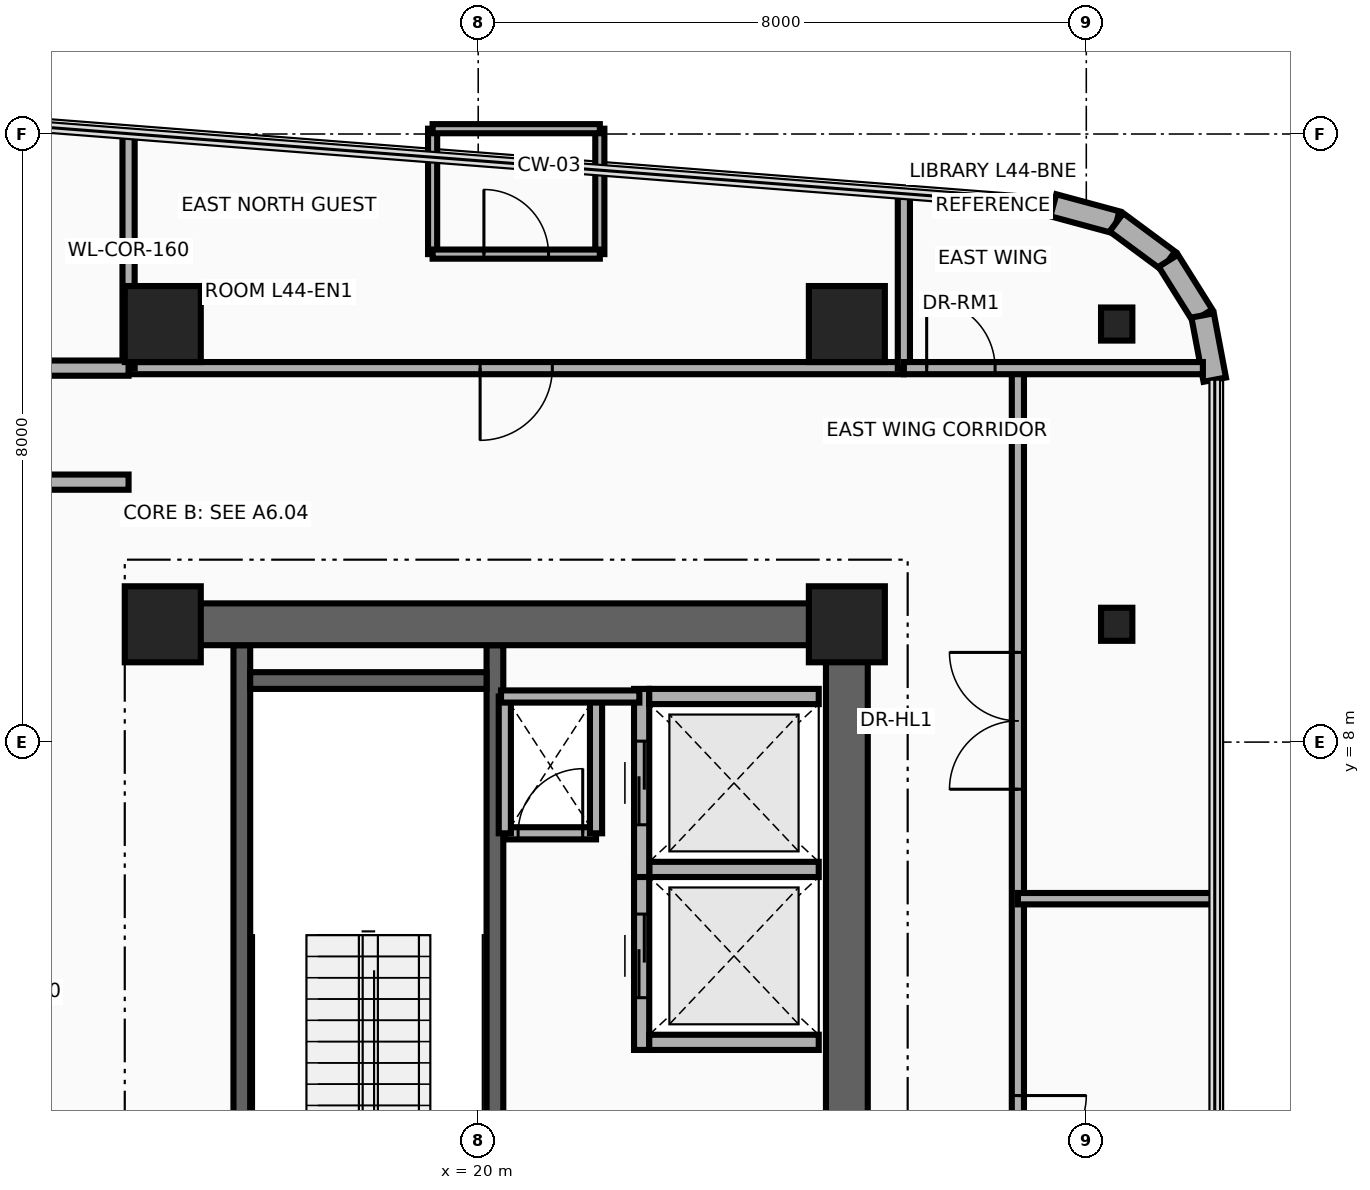
"""IFC4 building model, lengths in metres.
Left out: names, types, materials, properties, quantities, classifications, styles, units other than length and angle.
Written with IfcOpenShell. Run it as: python <this file> out.ifc"""

import sys

from ifc_helpers import new_model, si_unit, direction, frame, frame_2d, origin, origin_2d, place, context, subcontext, project, spatial, rectangle, i_section, extrude, source, transform, mapped, element, fill, save


model = new_model("IFC4")
c1 = context("Model", 3, precision=1e-05, world=origin(), true_north=direction((0.0, 1.0)))
c2 = subcontext(c1, "Body", "Model", "MODEL_VIEW")
j1 = project(units=[si_unit("LENGTHUNIT", "METRE"), si_unit("PLANEANGLEUNIT", "RADIAN")], contexts=[c1])
p1 = place(None, origin())
s1 = spatial("IfcSite", under=j1, at=p1, CompositionType="ELEMENT")
p2 = place(p1, origin())
s2 = spatial("IfcBuilding", under=s1, at=p2, CompositionType="ELEMENT")
p3 = place(p2, frame((0.0, 0.0, 172.3)))
s3 = spatial("IfcBuildingStorey", under=s2, at=p3, CompositionType="ELEMENT", Elevation=172.3)
for number, where, z_axis, x_axis in (
    (1, (16.89, 0.68, 0.0), (0.0, 0.0, 1.0), (0.0, 1.0, 0.0)),
    (2, (20.22, 0.68, 0.0), (0.0, 0.0, 1.0), (0.0, 1.0, 0.0)),
):
    element("IfcWall", number, at=place(p3, frame(where, z_axis=z_axis, x_axis=x_axis)), inside=s3, PredefinedType="SHEAR", context=c2, shape_type="SweptSolid", body=[
        extrude(rectangle(XDim=8.595, YDim=0.22, at=frame_2d((4.297, 0.0))), origin(), (0.0, 0.0, 1.0), 3.93),
    ])
p4 = place(p3, frame((17.0, 8.81, 0.0), z_axis=(0.0, 0.0, 1.0), x_axis=(1.0, 0.0, 0.0)))
e3 = element("IfcWall", 3, at=p4, inside=s3, PredefinedType="SHEAR", context=c2, shape_type="SweptSolid", body=[
    extrude(rectangle(XDim=3.11, YDim=0.22, at=frame_2d((1.555, 0.0))), origin(), (0.0, 0.0, 1.0), 3.93),
])
p5 = place(p3, frame((24.85, 0.95, 0.0), z_axis=(0.0, 0.0, 1.0), x_axis=(0.0, 1.0, 0.0)))
e4 = element("IfcWall", 4, at=p5, inside=s3, PredefinedType="SHEAR", context=c2, shape_type="SweptSolid", body=[
    extrude(rectangle(XDim=8.875, YDim=0.55, at=frame_2d((4.438, 0.0))), origin(), (0.0, 0.0, 1.0), 3.93),
])
p6 = place(p3, frame((15.85, 9.55, 0.0), z_axis=(0.0, 0.0, 1.0), x_axis=(1.0, 0.0, 0.0)))
e5 = element("IfcWall", 5, at=p6, inside=s3, PredefinedType="SHEAR", context=c2, shape_type="SweptSolid", body=[
    extrude(rectangle(XDim=9.0, YDim=0.55, at=frame_2d((4.5, 0.0))), origin(), (0.0, 0.0, 1.0), 3.93),
])
m1 = source(origin(), c2, "Body", "SweptSolid", [
    extrude(rectangle(XDim=1.0, YDim=1.0, at=origin_2d()), origin(), (0.0, 0.0, 1.0), 4.25),
])
for number, where, z_axis, x_axis in (
    (6, (15.85, 9.55, 0.0), (0.0, 0.0, 1.0), (1.0, 0.0, 0.0)),
    (7, (24.85, 9.55, 0.0), (0.0, 0.0, 1.0), (1.0, 0.0, 0.0)),
):
    element("IfcColumn", number, at=place(p3, frame(where, z_axis=z_axis, x_axis=x_axis)), inside=s3, PredefinedType="COLUMN", context=c2, shape_type="MappedRepresentation", body=[
        mapped(m1, transform((0.0, 0.0, 0.0), x_axis=(1.0, 0.0, 0.0), y_axis=(0.0, 1.0, 0.0), z_axis=(0.0, 0.0, 1.0), scale=1.0)),
    ])
m2 = source(origin(), c2, "Body", "SweptSolid", [
    extrude(i_section(OverallWidth=0.412, OverallDepth=0.435, WebThickness=0.036, FlangeThickness=0.057, at=origin_2d()), origin(), (0.0, 0.0, 1.0), 4.25),
])
p7 = place(p3, frame((28.4, 9.55, 0.0), z_axis=(0.0, 0.0, 1.0), x_axis=(1.0, 0.0, 0.0)))
e8 = element("IfcColumn", 8, at=p7, inside=s3, PredefinedType="COLUMN", context=c2, shape_type="MappedRepresentation", body=[
    mapped(m2, transform((0.0, 0.0, 0.0), x_axis=(1.0, 0.0, 0.0), y_axis=(0.0, 1.0, 0.0), z_axis=(0.0, 0.0, 1.0), scale=1.0)),
])
for number, where, z_axis, x_axis in (
    (9, (15.85, 13.5, 0.0), (0.0, 0.0, 1.0), (1.0, 0.0, 0.0)),
    (10, (24.85, 13.5, 0.0), (0.0, 0.0, 1.0), (1.0, 0.0, 0.0)),
):
    element("IfcColumn", number, at=place(p3, frame(where, z_axis=z_axis, x_axis=x_axis)), inside=s3, PredefinedType="COLUMN", context=c2, shape_type="MappedRepresentation", body=[
        mapped(m1, transform((0.0, 0.0, 0.0), x_axis=(1.0, 0.0, 0.0), y_axis=(0.0, 1.0, 0.0), z_axis=(0.0, 0.0, 1.0), scale=1.0)),
    ])
p8 = place(p3, frame((28.4, 13.5, 0.0), z_axis=(0.0, 0.0, 1.0), x_axis=(1.0, 0.0, 0.0)))
e11 = element("IfcColumn", 11, at=p8, inside=s3, PredefinedType="COLUMN", context=c2, shape_type="MappedRepresentation", body=[
    mapped(m2, transform((0.0, 0.0, 0.0), x_axis=(1.0, 0.0, 0.0), y_axis=(0.0, 1.0, 0.0), z_axis=(0.0, 0.0, 1.0), scale=1.0)),
])
p9 = place(p3, frame((27.566, 15.062, 0.0), z_axis=(0.0, 0.0, 1.0), x_axis=(0.965357594382, -0.260930479187, 0.0)))
e12 = element("IfcWall", 12, at=p9, inside=s3, PredefinedType="SOLIDWALL", context=c2, shape_type="SweptSolid", body=[
    extrude(rectangle(XDim=0.86, YDim=0.3, at=frame_2d((0.43, 0.0))), origin(), (0.0, 0.0, 1.0), 3.93),
])
p10 = place(p3, frame((28.396, 14.838, 0.0), z_axis=(0.0, 0.0, 1.0), x_axis=(0.803847397988, -0.594835574548, 0.0)))
e13 = element("IfcWall", 13, at=p10, inside=s3, PredefinedType="SOLIDWALL", context=c2, shape_type="SweptSolid", body=[
    extrude(rectangle(XDim=0.849, YDim=0.3, at=frame_2d((0.425, 0.0))), origin(), (0.0, 0.0, 1.0), 3.93),
])
p11 = place(p3, frame((29.079, 14.333, 0.0), z_axis=(0.0, 0.0, 1.0), x_axis=(0.53134147342, -0.847157741288, 0.0)))
e14 = element("IfcWall", 14, at=p11, inside=s3, PredefinedType="SOLIDWALL", context=c2, shape_type="SweptSolid", body=[
    extrude(rectangle(XDim=0.85, YDim=0.3, at=frame_2d((0.425, 0.0))), origin(), (0.0, 0.0, 1.0), 3.93),
])
p12 = place(p3, frame((29.531, 13.613, 0.0), z_axis=(0.0, 0.0, 1.0), x_axis=(0.185402686284, -0.982662629756, 0.0)))
e15 = element("IfcWall", 15, at=p12, inside=s3, PredefinedType="SOLIDWALL", context=c2, shape_type="SweptSolid", body=[
    extrude(rectangle(XDim=0.86, YDim=0.3, at=frame_2d((0.43, 0.0))), origin(), (0.0, 0.0, 1.0), 3.93),
])
p13 = place(p3, frame((22.15, 3.95, 0.0), z_axis=(0.0, 0.0, 1.0), x_axis=(0.0, 1.0, 0.0)))
e16 = element("IfcWall", 16, at=p13, inside=s3, PredefinedType="MOVABLE", context=c2, shape_type="SweptSolid", body=[
    extrude(rectangle(XDim=2.475, YDim=0.2, at=frame_2d((1.238, 0.0))), origin(), (0.0, 0.0, 1.0), 3.93),
])
p14 = place(p13, frame((0.688, 0.0, 0.0)))
e17 = element("IfcOpeningElement", 17, at=p14, cuts=e16, PredefinedType="OPENING", context=c2, shape_type="SweptSolid", body=[
    extrude(rectangle(XDim=1.1, YDim=2.1, at=frame_2d((0.55, 1.05))), frame((0.0, 0.115, 0.0), z_axis=(0.0, -1.0, 0.0), x_axis=(1.0, 0.0, 0.0)), (0.0, 0.0, 1.0), 0.23),
])
for number, where, z_axis, x_axis in (
    (18, (22.25, 4.05, 0.0), (0.0, 0.0, 1.0), (1.0, 0.0, 0.0)),
    (19, (22.25, 6.325, 0.0), (0.0, 0.0, 1.0), (1.0, 0.0, 0.0)),
):
    element("IfcWall", number, at=place(p3, frame(where, z_axis=z_axis, x_axis=x_axis)), inside=s3, PredefinedType="MOVABLE", context=c2, shape_type="SweptSolid", body=[
        extrude(rectangle(XDim=2.23, YDim=0.2, at=frame_2d((1.115, 0.0))), origin(), (0.0, 0.0, 1.0), 3.93),
    ])
p15 = place(p3, frame((22.15, 6.225, 0.0), z_axis=(0.0, 0.0, 1.0), x_axis=(0.0, 1.0, 0.0)))
e20 = element("IfcWall", 20, at=p15, inside=s3, PredefinedType="MOVABLE", context=c2, shape_type="SweptSolid", body=[
    extrude(rectangle(XDim=2.475, YDim=0.2, at=frame_2d((1.237, 0.0))), origin(), (0.0, 0.0, 1.0), 3.93),
])
p16 = place(p15, frame((0.688, 0.0, 0.0)))
e21 = element("IfcOpeningElement", 21, at=p16, cuts=e20, PredefinedType="OPENING", context=c2, shape_type="SweptSolid", body=[
    extrude(rectangle(XDim=1.1, YDim=2.1, at=frame_2d((0.55, 1.05))), frame((0.0, 0.115, 0.0), z_axis=(0.0, -1.0, 0.0), x_axis=(1.0, 0.0, 0.0)), (0.0, 0.0, 1.0), 0.23),
])
p17 = place(p3, frame((22.25, 8.6, 0.0), z_axis=(0.0, 0.0, 1.0), x_axis=(1.0, 0.0, 0.0)))
e22 = element("IfcWall", 22, at=p17, inside=s3, PredefinedType="MOVABLE", context=c2, shape_type="SweptSolid", body=[
    extrude(rectangle(XDim=2.23, YDim=0.2, at=frame_2d((1.115, 0.0))), origin(), (0.0, 0.0, 1.0), 3.93),
])
p18 = place(p3, frame((20.35, 6.8, 0.0), z_axis=(0.0, 0.0, 1.0), x_axis=(1.0, 0.0, 0.0)))
e23 = element("IfcWall", 23, at=p18, inside=s3, PredefinedType="PARTITIONING", context=c2, shape_type="SweptSolid", body=[
    extrude(rectangle(XDim=1.2, YDim=0.16, at=frame_2d((0.6, 0.0))), origin(), (0.0, 0.0, 1.0), 3.93),
])
p19 = place(p18, frame((0.175, 0.0, 0.0)))
e24 = element("IfcOpeningElement", 24, at=p19, cuts=e23, PredefinedType="OPENING", context=c2, shape_type="SweptSolid", body=[
    extrude(rectangle(XDim=0.85, YDim=2.05, at=frame_2d((0.425, 1.025))), frame((0.0, 0.095, 0.0), z_axis=(0.0, -1.0, 0.0), x_axis=(1.0, 0.0, 0.0)), (0.0, 0.0, 1.0), 0.19),
])
for number, where, z_axis, x_axis in (
    (25, (21.55, 6.8, 0.0), (0.0, 0.0, 1.0), (0.0, 1.0, 0.0)),
    (26, (20.35, 6.8, 0.0), (0.0, 0.0, 1.0), (0.0, 1.0, 0.0)),
):
    element("IfcWall", number, at=place(p3, frame(where, z_axis=z_axis, x_axis=x_axis)), inside=s3, PredefinedType="PARTITIONING", context=c2, shape_type="SweptSolid", body=[
        extrude(rectangle(XDim=1.8, YDim=0.16, at=frame_2d((0.9, 0.0))), origin(), (0.0, 0.0, 1.0), 3.93),
    ])
p20 = place(p3, frame((20.3, 8.6, 0.0), z_axis=(0.0, 0.0, 1.0), x_axis=(1.0, 0.0, 0.0)))
e27 = element("IfcWall", 27, at=p20, inside=s3, PredefinedType="PARTITIONING", context=c2, shape_type="SweptSolid", body=[
    extrude(rectangle(XDim=1.82, YDim=0.16, at=frame_2d((0.91, 0.0))), origin(), (0.0, 0.0, 1.0), 3.93),
])
p21 = place(p3, frame((15.4, 12.92, 0.0), z_axis=(0.0, 0.0, 1.0), x_axis=(1.0, 0.0, 0.0)))
e28 = element("IfcWall", 28, at=p21, inside=s3, PredefinedType="PARTITIONING", context=c2, shape_type="SweptSolid", body=[
    extrude(rectangle(XDim=10.2, YDim=0.16, at=frame_2d((5.1, 0.0))), origin(), (0.0, 0.0, 1.0), 2.715),
])
p22 = place(p21, frame((4.625, 0.0, 0.0)))
e29 = element("IfcOpeningElement", 29, at=p22, cuts=e28, PredefinedType="OPENING", context=c2, shape_type="SweptSolid", body=[
    extrude(rectangle(XDim=0.95, YDim=2.15, at=frame_2d((0.475, 1.075))), frame((0.0, 0.095, 0.0), z_axis=(0.0, -1.0, 0.0), x_axis=(1.0, 0.0, 0.0)), (0.0, 0.0, 1.0), 0.19),
])
p23 = place(p3, frame((15.4, 12.92, 0.0), z_axis=(0.0, 0.0, 1.0), x_axis=(0.0, 1.0, 0.0)))
e30 = element("IfcWall", 30, at=p23, inside=s3, PredefinedType="PARTITIONING", context=c2, shape_type="SweptSolid", body=[
    extrude(rectangle(XDim=3.084, YDim=0.16, at=frame_2d((1.542, 0.0))), origin(), (0.0, 0.0, 1.0), 2.715),
])
p24 = place(p3, frame((25.6, 12.92, 0.0), z_axis=(0.0, 0.0, 1.0), x_axis=(0.0, 1.0, 0.0)))
e31 = element("IfcWall", 31, at=p24, inside=s3, PredefinedType="PARTITIONING", context=c2, shape_type="SweptSolid", body=[
    extrude(rectangle(XDim=2.295, YDim=0.16, at=frame_2d((1.147, 0.0))), origin(), (0.0, 0.0, 1.0), 2.965),
])
for number, where, z_axis, x_axis in (
    (32, (19.4, 14.42, 0.0), (0.0, 0.0, 1.0), (0.0, 1.0, 0.0)),
    (33, (21.6, 14.42, 0.0), (0.0, 0.0, 1.0), (0.0, 1.0, 0.0)),
):
    element("IfcWall", number, at=place(p3, frame(where, z_axis=z_axis, x_axis=x_axis)), inside=s3, PredefinedType="PARTITIONING", context=c2, shape_type="SweptSolid", body=[
        extrude(rectangle(XDim=1.65, YDim=0.12, at=frame_2d((0.825, 0.0))), origin(), (0.0, 0.0, 1.0), 3.93),
    ])
p25 = place(p3, frame((19.4, 16.07, 0.0), z_axis=(0.0, 0.0, 1.0), x_axis=(1.0, 0.0, 0.0)))
e34 = element("IfcWall", 34, at=p25, inside=s3, PredefinedType="PARTITIONING", context=c2, shape_type="SweptSolid", body=[
    extrude(rectangle(XDim=2.2, YDim=0.12, at=frame_2d((1.1, 0.0))), origin(), (0.0, 0.0, 1.0), 3.93),
])
p26 = place(p3, frame((19.4, 14.42, 0.0), z_axis=(0.0, 0.0, 1.0), x_axis=(1.0, 0.0, 0.0)))
e35 = element("IfcWall", 35, at=p26, inside=s3, PredefinedType="PARTITIONING", context=c2, shape_type="SweptSolid", body=[
    extrude(rectangle(XDim=2.2, YDim=0.12, at=frame_2d((1.1, 0.0))), origin(), (0.0, 0.0, 1.0), 3.93),
])
p27 = place(p26, frame((0.675, 0.0, 0.0)))
e36 = element("IfcOpeningElement", 36, at=p27, cuts=e35, PredefinedType="OPENING", context=c2, shape_type="SweptSolid", body=[
    extrude(rectangle(XDim=0.85, YDim=2.1, at=frame_2d((0.425, 1.05))), frame((0.0, 0.075, 0.0), z_axis=(0.0, -1.0, 0.0), x_axis=(1.0, 0.0, 0.0)), (0.0, 0.0, 1.0), 0.15),
])
p28 = place(p3, frame((27.1, -11.89, 0.0), z_axis=(0.0, 0.0, 1.0), x_axis=(0.0, 1.0, 0.0)))
e37 = element("IfcWall", 37, at=p28, inside=s3, PredefinedType="PARTITIONING", context=c2, shape_type="SweptSolid", body=[
    extrude(rectangle(XDim=24.81, YDim=0.16, at=frame_2d((12.405, 0.0))), origin(), (0.0, 0.0, 1.0), 2.965),
])
p29 = place(p28, frame((1.12, 0.0, 0.0)))
e38 = element("IfcOpeningElement", 38, at=p29, cuts=e37, PredefinedType="OPENING", context=c2, shape_type="SweptSolid", body=[
    extrude(rectangle(XDim=0.9, YDim=2.1, at=frame_2d((0.45, 1.05))), frame((0.0, 0.095, 0.0), z_axis=(0.0, -1.0, 0.0), x_axis=(1.0, 0.0, 0.0)), (0.0, 0.0, 1.0), 0.19),
])
p30 = place(p28, frame((6.46, 0.0, 0.0)))
e39 = element("IfcOpeningElement", 39, at=p30, cuts=e37, PredefinedType="OPENING", context=c2, shape_type="SweptSolid", body=[
    extrude(rectangle(XDim=1.8, YDim=2.15, at=frame_2d((0.9, 1.075))), frame((0.0, 0.095, 0.0), z_axis=(0.0, -1.0, 0.0), x_axis=(1.0, 0.0, 0.0)), (0.0, 0.0, 1.0), 0.19),
])
p31 = place(p28, frame((13.44, 0.0, 0.0)))
e40 = element("IfcOpeningElement", 40, at=p31, cuts=e37, PredefinedType="OPENING", context=c2, shape_type="SweptSolid", body=[
    extrude(rectangle(XDim=1.8, YDim=2.15, at=frame_2d((0.9, 1.075))), frame((0.0, 0.095, 0.0), z_axis=(0.0, -1.0, 0.0), x_axis=(1.0, 0.0, 0.0)), (0.0, 0.0, 1.0), 0.19),
])
p32 = place(p28, frame((19.27, 0.0, 0.0)))
e41 = element("IfcOpeningElement", 41, at=p32, cuts=e37, PredefinedType="OPENING", context=c2, shape_type="SweptSolid", body=[
    extrude(rectangle(XDim=1.8, YDim=2.15, at=frame_2d((0.9, 1.075))), frame((0.0, 0.095, 0.0), z_axis=(0.0, -1.0, 0.0), x_axis=(1.0, 0.0, 0.0)), (0.0, 0.0, 1.0), 0.19),
])
p33 = place(p3, frame((25.6, 12.92, 0.0), z_axis=(0.0, 0.0, 1.0), x_axis=(1.0, 0.0, 0.0)))
e42 = element("IfcWall", 42, at=p33, inside=s3, PredefinedType="PARTITIONING", context=c2, shape_type="SweptSolid", body=[
    extrude(rectangle(XDim=3.934, YDim=0.16, at=frame_2d((1.967, 0.0))), origin(), (0.0, 0.0, 1.0), 3.376),
])
p34 = place(p33, frame((0.3, 0.0, 0.0)))
e43 = element("IfcOpeningElement", 43, at=p34, cuts=e42, PredefinedType="OPENING", context=c2, shape_type="SweptSolid", body=[
    extrude(rectangle(XDim=0.9, YDim=2.1, at=frame_2d((0.45, 1.05))), frame((0.0, 0.095, 0.0), z_axis=(0.0, -1.0, 0.0), x_axis=(1.0, 0.0, 0.0)), (0.0, 0.0, 1.0), 0.19),
])
p35 = place(p3, frame((27.1, 5.94, 0.0), z_axis=(0.0, 0.0, 1.0), x_axis=(1.0, 0.0, 0.0)))
e44 = element("IfcWall", 44, at=p35, inside=s3, PredefinedType="PARTITIONING", context=c2, shape_type="SweptSolid", body=[
    extrude(rectangle(XDim=2.59, YDim=0.15, at=frame_2d((1.295, 0.0))), origin(), (0.0, 0.0, 1.0), 3.376),
])
p36 = place(p3, frame((13.42, 12.92, 0.0), z_axis=(0.0, 0.0, 1.0), x_axis=(1.0, 0.0, 0.0)))
e45 = element("IfcWall", 45, at=p36, inside=s3, PredefinedType="PARTITIONING", context=c2, shape_type="SweptSolid", body=[
    extrude(rectangle(XDim=1.98, YDim=0.2, at=frame_2d((0.99, 0.0))), origin(), (0.0, 0.0, 1.0), 2.715),
])
p37 = place(p3, frame((13.42, 11.42, 0.0), z_axis=(0.0, 0.0, 1.0), x_axis=(1.0, 0.0, 0.0)))
e46 = element("IfcWall", 46, at=p37, inside=s3, PredefinedType="PARTITIONING", context=c2, shape_type="SweptSolid", body=[
    extrude(rectangle(XDim=1.98, YDim=0.2, at=frame_2d((0.99, 0.0))), origin(), (0.0, 0.0, 1.0), 3.304),
])
p38 = place(p14, origin())
e47 = element("IfcDoor", 47, at=p38, inside=s3, OperationType="DOUBLE_DOOR_SLIDING", PredefinedType="DOOR", context=c2, shape_type="SweptSolid", body=[
    extrude(rectangle(XDim=1.1, YDim=2.1, at=frame_2d((0.55, 1.05))), frame((0.0, 0.025, 0.0), z_axis=(0.0, -1.0, 0.0), x_axis=(1.0, 0.0, 0.0)), (0.0, 0.0, 1.0), 0.05),
])
fill(e17, e47)
p39 = place(p16, origin())
e48 = element("IfcDoor", 48, at=p39, inside=s3, OperationType="DOUBLE_DOOR_SLIDING", PredefinedType="DOOR", context=c2, shape_type="SweptSolid", body=[
    extrude(rectangle(XDim=1.1, YDim=2.1, at=frame_2d((0.55, 1.05))), frame((0.0, 0.025, 0.0), z_axis=(0.0, -1.0, 0.0), x_axis=(1.0, 0.0, 0.0)), (0.0, 0.0, 1.0), 0.05),
])
fill(e21, e48)
p40 = place(p19, origin())
e49 = element("IfcDoor", 49, at=p40, inside=s3, OperationType="SINGLE_SWING_RIGHT", PredefinedType="DOOR", context=c2, shape_type="SweptSolid", body=[
    extrude(rectangle(XDim=0.85, YDim=2.05, at=frame_2d((0.425, 1.025))), frame((0.0, 0.025, 0.0), z_axis=(0.0, -1.0, 0.0), x_axis=(1.0, 0.0, 0.0)), (0.0, 0.0, 1.0), 0.05),
])
fill(e24, e49)
p41 = place(p22, frame((0.95, 0.0, 0.0), z_axis=(0.0, 0.0, 1.0), x_axis=(-1.0, 0.0, 0.0)))
e50 = element("IfcDoor", 50, at=p41, inside=s3, OperationType="SINGLE_SWING_LEFT", PredefinedType="DOOR", context=c2, shape_type="SweptSolid", body=[
    extrude(rectangle(XDim=0.95, YDim=2.15, at=frame_2d((0.475, 1.075))), frame((0.0, 0.025, 0.0), z_axis=(0.0, -1.0, 0.0), x_axis=(1.0, 0.0, 0.0)), (0.0, 0.0, 1.0), 0.05),
])
fill(e29, e50)
p42 = place(p27, origin())
e51 = element("IfcDoor", 51, at=p42, inside=s3, OperationType="SINGLE_SWING_RIGHT", PredefinedType="DOOR", context=c2, shape_type="SweptSolid", body=[
    extrude(rectangle(XDim=0.85, YDim=2.1, at=frame_2d((0.425, 1.05))), frame((0.0, 0.025, 0.0), z_axis=(0.0, -1.0, 0.0), x_axis=(1.0, 0.0, 0.0)), (0.0, 0.0, 1.0), 0.05),
])
fill(e36, e51)
p43 = place(p34, origin())
e52 = element("IfcDoor", 52, at=p43, inside=s3, OperationType="SINGLE_SWING_RIGHT", PredefinedType="DOOR", context=c2, shape_type="SweptSolid", body=[
    extrude(rectangle(XDim=0.9, YDim=2.1, at=frame_2d((0.45, 1.05))), frame((0.0, 0.025, 0.0), z_axis=(0.0, -1.0, 0.0), x_axis=(1.0, 0.0, 0.0)), (0.0, 0.0, 1.0), 0.05),
])
fill(e43, e52)
p44 = place(p31, frame((1.8, 0.0, 0.0), z_axis=(0.0, 0.0, 1.0), x_axis=(-1.0, 0.0, 0.0)))
e53 = element("IfcDoor", 53, at=p44, inside=s3, OperationType="DOUBLE_DOOR_SINGLE_SWING", PredefinedType="DOOR", context=c2, shape_type="SweptSolid", body=[
    extrude(rectangle(XDim=1.8, YDim=2.15, at=frame_2d((0.9, 1.075))), frame((0.0, 0.025, 0.0), z_axis=(0.0, -1.0, 0.0), x_axis=(1.0, 0.0, 0.0)), (0.0, 0.0, 1.0), 0.05),
])
fill(e40, e53)
p45 = place(p32, origin())
e54 = element("IfcDoor", 54, at=p45, inside=s3, OperationType="DOUBLE_DOOR_SINGLE_SWING", PredefinedType="DOOR", context=c2, shape_type="SweptSolid", body=[
    extrude(rectangle(XDim=1.8, YDim=2.15, at=frame_2d((0.9, 1.075))), frame((0.0, 0.025, 0.0), z_axis=(0.0, -1.0, 0.0), x_axis=(1.0, 0.0, 0.0)), (0.0, 0.0, 1.0), 0.05),
])
fill(e41, e54)
save(model, sys.argv[1])
